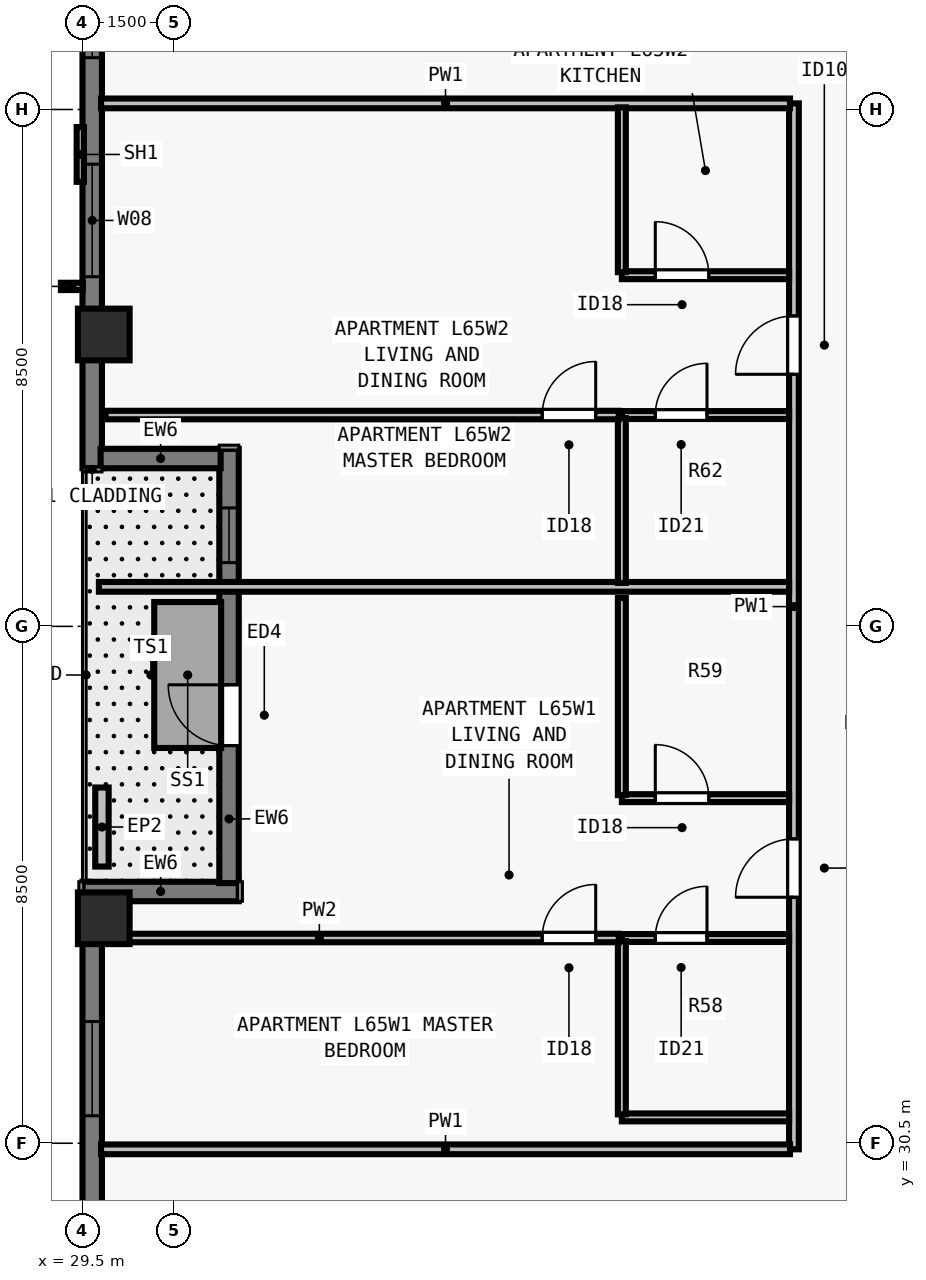
"""IFC4 building model, lengths in metres.
Left out: names, types, materials, properties, quantities, classifications, styles, units other than length and angle.
Written with IfcOpenShell. Run it as: python <this file> out.ifc"""

import sys

from ifc_helpers import new_model, si_unit, direction, frame, frame_2d, origin, origin_2d, place, context, subcontext, project, spatial, rectangle, extrude, element, fill, save


model = new_model("IFC4")
c1 = context("Model", 3, precision=1e-05, world=origin(), true_north=direction((0.0, 1.0)))
c2 = subcontext(c1, "Body", "Model", "MODEL_VIEW")
j1 = project(units=[si_unit("LENGTHUNIT", "METRE"), si_unit("PLANEANGLEUNIT", "RADIAN")], contexts=[c1])
p1 = place(None, origin())
s1 = spatial("IfcSite", under=j1, at=p1, CompositionType="ELEMENT")
p2 = place(p1, origin())
s2 = spatial("IfcBuilding", under=s1, at=p2, CompositionType="ELEMENT")
p3 = place(p2, frame((0.0, 0.0, 237.5)))
s3 = spatial("IfcBuildingStorey", under=s2, at=p3, CompositionType="ELEMENT", Elevation=237.5)
for number, where, z_axis, x_axis in (
    (1, (29.85, 43.8, 0.0), (0.0, 0.0, 1.0), (0.0, 1.0, 0.0)),
    (2, (29.85, 34.2, 0.0), (0.0, 0.0, 1.0), (0.0, 1.0, 0.0)),
):
    element("IfcColumn", number, at=place(p3, frame(where, z_axis=z_axis, x_axis=x_axis)), inside=s3, PredefinedType="COLUMN", context=c2, shape_type="SweptSolid", body=[
        extrude(rectangle(XDim=0.85, YDim=0.85, at=origin_2d()), origin(), (0.0, 0.0, 1.0), 3.5),
    ])
p4 = place(p3, frame((29.66, 41.6, 0.0), z_axis=(0.0, 0.0, 1.0), x_axis=(0.0, 1.0, 0.0)))
e3 = element("IfcWall", 3, at=p4, inside=s3, PredefinedType="SOLIDWALL", context=c2, shape_type="SweptSolid", body=[
    extrude(rectangle(XDim=14.602, YDim=0.32, at=frame_2d((7.301, 0.0))), origin(), (0.0, 0.0, 1.0), 3.29),
])
p5 = place(p4, frame((3.15, 0.0, 0.8)))
e4 = element("IfcOpeningElement", 4, at=p5, cuts=e3, PredefinedType="OPENING", context=c2, shape_type="SweptSolid", body=[
    extrude(rectangle(XDim=1.85, YDim=1.678, at=frame_2d((0.925, 0.839))), frame((0.0, 0.17, 0.0), z_axis=(0.0, -1.0, 0.0), x_axis=(1.0, 0.0, 0.0)), (0.0, 0.0, 1.0), 0.34),
])
p6 = place(p4, frame((6.751, 0.0, 0.8)))
e5 = element("IfcOpeningElement", 5, at=p6, cuts=e3, PredefinedType="OPENING", context=c2, shape_type="SweptSolid", body=[
    extrude(rectangle(XDim=1.55, YDim=1.678, at=frame_2d((0.775, 0.839))), frame((0.0, 0.17, 0.0), z_axis=(0.0, -1.0, 0.0), x_axis=(1.0, 0.0, 0.0)), (0.0, 0.0, 1.0), 0.34),
])
p7 = place(p3, frame((29.66, 21.5, 0.0), z_axis=(0.0, 0.0, 1.0), x_axis=(0.0, 1.0, 0.0)))
e6 = element("IfcWall", 6, at=p7, inside=s3, PredefinedType="SOLIDWALL", context=c2, shape_type="SweptSolid", body=[
    extrude(rectangle(XDim=13.002, YDim=0.32, at=frame_2d((6.501, 0.0))), origin(), (0.0, 0.0, 1.0), 3.29),
])
p8 = place(p7, frame((9.451, 0.0, 0.8)))
e7 = element("IfcOpeningElement", 7, at=p8, cuts=e6, PredefinedType="OPENING", context=c2, shape_type="SweptSolid", body=[
    extrude(rectangle(XDim=1.55, YDim=1.678, at=frame_2d((0.775, 0.839))), frame((0.0, 0.17, 0.0), z_axis=(0.0, -1.0, 0.0), x_axis=(1.0, 0.0, 0.0)), (0.0, 0.0, 1.0), 0.34),
])
p9 = place(p3, frame((29.5, 34.64, 0.0), z_axis=(0.0, 0.0, 1.0), x_axis=(1.0, 0.0, 0.0)))
e8 = element("IfcWall", 8, at=p9, inside=s3, PredefinedType="SOLIDWALL", context=c2, shape_type="SweptSolid", body=[
    extrude(rectangle(XDim=2.57, YDim=0.32, at=frame_2d((1.285, 0.0))), origin(), (0.0, 0.0, 1.0), 3.29),
])
p10 = place(p3, frame((31.91, 34.778, 0.0), z_axis=(0.0, 0.0, 1.0), x_axis=(0.0, 1.0, 0.0)))
e9 = element("IfcWall", 9, at=p10, inside=s3, PredefinedType="SOLIDWALL", context=c2, shape_type="SweptSolid", body=[
    extrude(rectangle(XDim=7.142, YDim=0.32, at=frame_2d((3.571, 0.0))), origin(), (0.0, 0.0, 1.0), 3.29),
])
p11 = place(p10, frame((2.261, 0.0, 0.0)))
e10 = element("IfcOpeningElement", 10, at=p11, cuts=e9, PredefinedType="OPENING", context=c2, shape_type="SweptSolid", body=[
    extrude(rectangle(XDim=1.0, YDim=2.15, at=frame_2d((0.5, 1.075))), frame((0.0, 0.17, 0.0), z_axis=(0.0, -1.0, 0.0), x_axis=(1.0, 0.0, 0.0)), (0.0, 0.0, 1.0), 0.34),
])
p12 = place(p10, frame((5.27, 0.0, 0.8)))
e11 = element("IfcOpeningElement", 11, at=p12, cuts=e9, PredefinedType="OPENING", context=c2, shape_type="SweptSolid", body=[
    extrude(rectangle(XDim=0.9, YDim=1.678, at=frame_2d((0.45, 0.839))), frame((0.0, 0.17, 0.0), z_axis=(0.0, -1.0, 0.0), x_axis=(1.0, 0.0, 0.0)), (0.0, 0.0, 1.0), 0.34),
])
p13 = place(p3, frame((31.772, 41.76, 0.0), z_axis=(0.0, 0.0, 1.0), x_axis=(-1.0, 0.0, 0.0)))
e12 = element("IfcWall", 12, at=p13, inside=s3, PredefinedType="SOLIDWALL", context=c2, shape_type="SweptSolid", body=[
    extrude(rectangle(XDim=1.974, YDim=0.32, at=frame_2d((0.987, 0.0))), origin(), (0.0, 0.0, 1.0), 3.29),
])
p14 = place(p3, frame((29.82, 35.05, 0.0), z_axis=(0.0, 0.0, 1.0), x_axis=(0.0, 1.0, 0.0)))
e13 = element("IfcWall", 13, at=p14, inside=s3, PredefinedType="PARAPET", context=c2, shape_type="SweptSolid", body=[
    extrude(rectangle(XDim=1.3, YDim=0.22, at=frame_2d((0.65, 0.0))), origin(), (0.0, 0.0, 1.0), 0.55),
])
p15 = place(p3, frame((41.2, 30.4, 0.0), z_axis=(0.0, 0.0, 1.0), x_axis=(0.0, 1.0, 0.0)))
e14 = element("IfcWall", 14, at=p15, inside=s3, PredefinedType="PARTITIONING", context=c2, shape_type="SweptSolid", body=[
    extrude(rectangle(XDim=17.2, YDim=0.16, at=frame_2d((8.6, 0.0))), origin(), (0.0, 0.0, 1.0), 3.29),
])
p16 = place(p15, frame((4.145, 0.0, 0.0)))
e15 = element("IfcOpeningElement", 15, at=p16, cuts=e14, PredefinedType="OPENING", context=c2, shape_type="SweptSolid", body=[
    extrude(rectangle(XDim=0.96, YDim=2.18, at=frame_2d((0.48, 1.09))), frame((0.0, 0.09, 0.0), z_axis=(0.0, -1.0, 0.0), x_axis=(1.0, 0.0, 0.0)), (0.0, 0.0, 1.0), 0.18),
])
p17 = place(p15, frame((12.745, 0.0, 0.0)))
e16 = element("IfcOpeningElement", 16, at=p17, cuts=e14, PredefinedType="OPENING", context=c2, shape_type="SweptSolid", body=[
    extrude(rectangle(XDim=0.96, YDim=2.18, at=frame_2d((0.48, 1.09))), frame((0.0, 0.09, 0.0), z_axis=(0.0, -1.0, 0.0), x_axis=(1.0, 0.0, 0.0)), (0.0, 0.0, 1.0), 0.18),
])
for number, where, z_axis, x_axis in (
    (17, (29.805, 30.4, 0.0), (0.0, 0.0, 1.0), (1.0, 0.0, 0.0)),
    (18, (29.805, 47.6, 0.0), (0.0, 0.0, 1.0), (1.0, 0.0, 0.0)),
):
    element("IfcWall", number, at=place(p3, frame(where, z_axis=z_axis, x_axis=x_axis)), inside=s3, PredefinedType="PARTITIONING", context=c2, shape_type="SweptSolid", body=[
        extrude(rectangle(XDim=11.33, YDim=0.16, at=frame_2d((5.665, 0.0))), origin(), (0.0, 0.0, 1.0), 3.29),
    ])
p18 = place(p3, frame((29.77, 39.65, 0.0), z_axis=(0.0, 0.0, 1.0), x_axis=(1.0, 0.0, 0.0)))
e19 = element("IfcWall", 19, at=p18, inside=s3, PredefinedType="PARTITIONING", context=c2, shape_type="SweptSolid", body=[
    extrude(rectangle(XDim=11.35, YDim=0.16, at=frame_2d((5.675, 0.0))), origin(), (0.0, 0.0, 1.0), 2.958),
])
p19 = place(p3, frame((38.37, 30.925, 0.0), z_axis=(0.0, 0.0, 1.0), x_axis=(1.0, 0.0, 0.0)))
e20 = element("IfcWall", 20, at=p19, inside=s3, PredefinedType="PLUMBINGWALL", context=c2, shape_type="SweptSolid", body=[
    extrude(rectangle(XDim=2.75, YDim=0.13, at=frame_2d((1.375, 0.0))), origin(), (0.0, 0.0, 1.0), 3.29),
])
p20 = place(p3, frame((38.37, 33.875, 0.0), z_axis=(0.0, 0.0, 1.0), x_axis=(1.0, 0.0, 0.0)))
e21 = element("IfcWall", 21, at=p20, inside=s3, PredefinedType="PLUMBINGWALL", context=c2, shape_type="SweptSolid", body=[
    extrude(rectangle(XDim=2.75, YDim=0.13, at=frame_2d((1.375, 0.0))), origin(), (0.0, 0.0, 1.0), 3.29),
])
p21 = place(p20, frame((0.55, 0.0, 0.0)))
e22 = element("IfcOpeningElement", 22, at=p21, cuts=e21, PredefinedType="OPENING", context=c2, shape_type="SweptSolid", body=[
    extrude(rectangle(XDim=0.85, YDim=2.08, at=frame_2d((0.425, 1.04))), frame((0.0, 0.075, 0.0), z_axis=(0.0, -1.0, 0.0), x_axis=(1.0, 0.0, 0.0)), (0.0, 0.0, 1.0), 0.15),
])
p22 = place(p3, frame((38.37, 30.975, 0.0), z_axis=(0.0, 0.0, 1.0), x_axis=(0.0, 1.0, 0.0)))
e23 = element("IfcWall", 23, at=p22, inside=s3, PredefinedType="PLUMBINGWALL", context=c2, shape_type="SweptSolid", body=[
    extrude(rectangle(XDim=2.85, YDim=0.13, at=frame_2d((1.425, 0.0))), origin(), (0.0, 0.0, 1.0), 3.29),
])
p23 = place(p3, frame((38.37, 36.175, 0.0), z_axis=(0.0, 0.0, 1.0), x_axis=(1.0, 0.0, 0.0)))
e24 = element("IfcWall", 24, at=p23, inside=s3, PredefinedType="PLUMBINGWALL", context=c2, shape_type="SweptSolid", body=[
    extrude(rectangle(XDim=2.75, YDim=0.13, at=frame_2d((1.375, 0.0))), origin(), (0.0, 0.0, 1.0), 3.29),
])
p24 = place(p23, frame((0.55, 0.0, 0.0)))
e25 = element("IfcOpeningElement", 25, at=p24, cuts=e24, PredefinedType="OPENING", context=c2, shape_type="SweptSolid", body=[
    extrude(rectangle(XDim=0.88, YDim=2.1, at=frame_2d((0.44, 1.05))), frame((0.0, 0.075, 0.0), z_axis=(0.0, -1.0, 0.0), x_axis=(1.0, 0.0, 0.0)), (0.0, 0.0, 1.0), 0.15),
])
p25 = place(p3, frame((38.37, 36.225, 0.0), z_axis=(0.0, 0.0, 1.0), x_axis=(0.0, 1.0, 0.0)))
e26 = element("IfcWall", 26, at=p25, inside=s3, PredefinedType="PLUMBINGWALL", context=c2, shape_type="SweptSolid", body=[
    extrude(rectangle(XDim=3.24, YDim=0.13, at=frame_2d((1.62, 0.0))), origin(), (0.0, 0.0, 1.0), 3.29),
])
p26 = place(p3, frame((29.88, 33.875, 0.0), z_axis=(0.0, 0.0, 1.0), x_axis=(1.0, 0.0, 0.0)))
e27 = element("IfcWall", 27, at=p26, inside=s3, PredefinedType="PARTITIONING", context=c2, shape_type="SweptSolid", body=[
    extrude(rectangle(XDim=8.44, YDim=0.14, at=frame_2d((4.22, 0.0))), origin(), (0.0, 0.0, 1.0), 2.573),
])
p27 = place(p26, frame((7.18, 0.0, 0.0)))
e28 = element("IfcOpeningElement", 28, at=p27, cuts=e27, PredefinedType="OPENING", context=c2, shape_type="SweptSolid", body=[
    extrude(rectangle(XDim=0.88, YDim=2.1, at=frame_2d((0.44, 1.05))), frame((0.0, 0.08, 0.0), z_axis=(0.0, -1.0, 0.0), x_axis=(1.0, 0.0, 0.0)), (0.0, 0.0, 1.0), 0.16),
])
p28 = place(p3, frame((38.37, 42.475, 0.0), z_axis=(0.0, 0.0, 1.0), x_axis=(1.0, 0.0, 0.0)))
e29 = element("IfcWall", 29, at=p28, inside=s3, PredefinedType="PLUMBINGWALL", context=c2, shape_type="SweptSolid", body=[
    extrude(rectangle(XDim=2.75, YDim=0.13, at=frame_2d((1.375, 0.0))), origin(), (0.0, 0.0, 1.0), 2.958),
])
p29 = place(p28, frame((0.55, 0.0, 0.0)))
e30 = element("IfcOpeningElement", 30, at=p29, cuts=e29, PredefinedType="OPENING", context=c2, shape_type="SweptSolid", body=[
    extrude(rectangle(XDim=0.85, YDim=2.08, at=frame_2d((0.425, 1.04))), frame((0.0, 0.075, 0.0), z_axis=(0.0, -1.0, 0.0), x_axis=(1.0, 0.0, 0.0)), (0.0, 0.0, 1.0), 0.15),
])
p30 = place(p3, frame((38.37, 39.715, 0.0), z_axis=(0.0, 0.0, 1.0), x_axis=(0.0, 1.0, 0.0)))
e31 = element("IfcWall", 31, at=p30, inside=s3, PredefinedType="PLUMBINGWALL", context=c2, shape_type="SweptSolid", body=[
    extrude(rectangle(XDim=2.71, YDim=0.13, at=frame_2d((1.355, 0.0))), origin(), (0.0, 0.0, 1.0), 3.29),
])
p31 = place(p3, frame((38.37, 44.775, 0.0), z_axis=(0.0, 0.0, 1.0), x_axis=(1.0, 0.0, 0.0)))
e32 = element("IfcWall", 32, at=p31, inside=s3, PredefinedType="PLUMBINGWALL", context=c2, shape_type="SweptSolid", body=[
    extrude(rectangle(XDim=2.75, YDim=0.13, at=frame_2d((1.375, 0.0))), origin(), (0.0, 0.0, 1.0), 2.958),
])
p32 = place(p31, frame((0.55, 0.0, 0.0)))
e33 = element("IfcOpeningElement", 33, at=p32, cuts=e32, PredefinedType="OPENING", context=c2, shape_type="SweptSolid", body=[
    extrude(rectangle(XDim=0.88, YDim=2.1, at=frame_2d((0.44, 1.05))), frame((0.0, 0.075, 0.0), z_axis=(0.0, -1.0, 0.0), x_axis=(1.0, 0.0, 0.0)), (0.0, 0.0, 1.0), 0.15),
])
p33 = place(p3, frame((38.37, 44.825, 0.0), z_axis=(0.0, 0.0, 1.0), x_axis=(0.0, 1.0, 0.0)))
e34 = element("IfcWall", 34, at=p33, inside=s3, PredefinedType="PLUMBINGWALL", context=c2, shape_type="SweptSolid", body=[
    extrude(rectangle(XDim=2.71, YDim=0.13, at=frame_2d((1.355, 0.0))), origin(), (0.0, 0.0, 1.0), 3.29),
])
p34 = place(p3, frame((29.88, 42.475, 0.0), z_axis=(0.0, 0.0, 1.0), x_axis=(1.0, 0.0, 0.0)))
e35 = element("IfcWall", 35, at=p34, inside=s3, PredefinedType="PARTITIONING", context=c2, shape_type="SweptSolid", body=[
    extrude(rectangle(XDim=8.44, YDim=0.14, at=frame_2d((4.22, 0.0))), origin(), (0.0, 0.0, 1.0), 3.29),
])
p35 = place(p34, frame((7.18, 0.0, 0.0)))
e36 = element("IfcOpeningElement", 36, at=p35, cuts=e35, PredefinedType="OPENING", context=c2, shape_type="SweptSolid", body=[
    extrude(rectangle(XDim=0.88, YDim=2.1, at=frame_2d((0.44, 1.05))), frame((0.0, 0.08, 0.0), z_axis=(0.0, -1.0, 0.0), x_axis=(1.0, 0.0, 0.0)), (0.0, 0.0, 1.0), 0.16),
])
p36 = place(p5, origin())
e37 = element("IfcWindow", 37, at=p36, inside=s3, PartitioningType="SINGLE_PANEL", PredefinedType="WINDOW", context=c2, shape_type="SweptSolid", body=[
    extrude(rectangle(XDim=1.85, YDim=1.678, at=frame_2d((0.925, 0.839))), frame((0.0, -0.05, 0.0), z_axis=(0.0, -1.0, 0.0), x_axis=(1.0, 0.0, 0.0)), (0.0, 0.0, 1.0), 0.06),
])
fill(e4, e37)
p37 = place(p6, origin())
e38 = element("IfcWindow", 38, at=p37, inside=s3, PartitioningType="SINGLE_PANEL", PredefinedType="WINDOW", context=c2, shape_type="SweptSolid", body=[
    extrude(rectangle(XDim=1.55, YDim=1.678, at=frame_2d((0.775, 0.839))), frame((0.0, -0.05, 0.0), z_axis=(0.0, -1.0, 0.0), x_axis=(1.0, 0.0, 0.0)), (0.0, 0.0, 1.0), 0.06),
])
fill(e5, e38)
p38 = place(p8, origin())
e39 = element("IfcWindow", 39, at=p38, inside=s3, PartitioningType="SINGLE_PANEL", PredefinedType="WINDOW", context=c2, shape_type="SweptSolid", body=[
    extrude(rectangle(XDim=1.55, YDim=1.678, at=frame_2d((0.775, 0.839))), frame((0.0, -0.05, 0.0), z_axis=(0.0, -1.0, 0.0), x_axis=(1.0, 0.0, 0.0)), (0.0, 0.0, 1.0), 0.06),
])
fill(e7, e39)
p39 = place(p11, origin())
e40 = element("IfcDoor", 40, at=p39, inside=s3, OperationType="SINGLE_SWING_RIGHT", PredefinedType="DOOR", context=c2, shape_type="SweptSolid", body=[
    extrude(rectangle(XDim=1.0, YDim=2.15, at=frame_2d((0.5, 1.075))), frame((0.0, 0.025, 0.0), z_axis=(0.0, -1.0, 0.0), x_axis=(1.0, 0.0, 0.0)), (0.0, 0.0, 1.0), 0.05),
])
fill(e10, e40)
p40 = place(p12, origin())
e41 = element("IfcWindow", 41, at=p40, inside=s3, PartitioningType="SINGLE_PANEL", PredefinedType="WINDOW", context=c2, shape_type="SweptSolid", body=[
    extrude(rectangle(XDim=0.9, YDim=1.678, at=frame_2d((0.45, 0.839))), frame((0.0, -0.04, 0.0), z_axis=(0.0, -1.0, 0.0), x_axis=(1.0, 0.0, 0.0)), (0.0, 0.0, 1.0), 0.06),
])
fill(e11, e41)
p41 = place(p21, origin())
e42 = element("IfcDoor", 42, at=p41, inside=s3, OperationType="SINGLE_SWING_RIGHT", PredefinedType="DOOR", context=c2, shape_type="SweptSolid", body=[
    extrude(rectangle(XDim=0.85, YDim=2.08, at=frame_2d((0.425, 1.04))), frame((0.0, 0.025, 0.0), z_axis=(0.0, -1.0, 0.0), x_axis=(1.0, 0.0, 0.0)), (0.0, 0.0, 1.0), 0.05),
])
fill(e22, e42)
p42 = place(p24, origin())
e43 = element("IfcDoor", 43, at=p42, inside=s3, OperationType="SINGLE_SWING_LEFT", PredefinedType="DOOR", context=c2, shape_type="SweptSolid", body=[
    extrude(rectangle(XDim=0.88, YDim=2.1, at=frame_2d((0.44, 1.05))), frame((0.0, 0.025, 0.0), z_axis=(0.0, -1.0, 0.0), x_axis=(1.0, 0.0, 0.0)), (0.0, 0.0, 1.0), 0.05),
])
fill(e25, e43)
p43 = place(p27, origin())
e44 = element("IfcDoor", 44, at=p43, inside=s3, OperationType="SINGLE_SWING_RIGHT", PredefinedType="DOOR", context=c2, shape_type="SweptSolid", body=[
    extrude(rectangle(XDim=0.88, YDim=2.1, at=frame_2d((0.44, 1.05))), frame((0.0, 0.025, 0.0), z_axis=(0.0, -1.0, 0.0), x_axis=(1.0, 0.0, 0.0)), (0.0, 0.0, 1.0), 0.05),
])
fill(e28, e44)
p44 = place(p16, origin())
e45 = element("IfcDoor", 45, at=p44, inside=s3, OperationType="SINGLE_SWING_LEFT", PredefinedType="DOOR", context=c2, shape_type="SweptSolid", body=[
    extrude(rectangle(XDim=0.96, YDim=2.18, at=frame_2d((0.48, 1.09))), frame((0.0, 0.025, 0.0), z_axis=(0.0, -1.0, 0.0), x_axis=(1.0, 0.0, 0.0)), (0.0, 0.0, 1.0), 0.05),
])
fill(e15, e45)
p45 = place(p29, origin())
e46 = element("IfcDoor", 46, at=p45, inside=s3, OperationType="SINGLE_SWING_RIGHT", PredefinedType="DOOR", context=c2, shape_type="SweptSolid", body=[
    extrude(rectangle(XDim=0.85, YDim=2.08, at=frame_2d((0.425, 1.04))), frame((0.0, 0.025, 0.0), z_axis=(0.0, -1.0, 0.0), x_axis=(1.0, 0.0, 0.0)), (0.0, 0.0, 1.0), 0.05),
])
fill(e30, e46)
p46 = place(p32, origin())
e47 = element("IfcDoor", 47, at=p46, inside=s3, OperationType="SINGLE_SWING_LEFT", PredefinedType="DOOR", context=c2, shape_type="SweptSolid", body=[
    extrude(rectangle(XDim=0.88, YDim=2.1, at=frame_2d((0.44, 1.05))), frame((0.0, 0.025, 0.0), z_axis=(0.0, -1.0, 0.0), x_axis=(1.0, 0.0, 0.0)), (0.0, 0.0, 1.0), 0.05),
])
fill(e33, e47)
p47 = place(p35, origin())
e48 = element("IfcDoor", 48, at=p47, inside=s3, OperationType="SINGLE_SWING_RIGHT", PredefinedType="DOOR", context=c2, shape_type="SweptSolid", body=[
    extrude(rectangle(XDim=0.88, YDim=2.1, at=frame_2d((0.44, 1.05))), frame((0.0, 0.025, 0.0), z_axis=(0.0, -1.0, 0.0), x_axis=(1.0, 0.0, 0.0)), (0.0, 0.0, 1.0), 0.05),
])
fill(e36, e48)
p48 = place(p17, origin())
e49 = element("IfcDoor", 49, at=p48, inside=s3, OperationType="SINGLE_SWING_LEFT", PredefinedType="DOOR", context=c2, shape_type="SweptSolid", body=[
    extrude(rectangle(XDim=0.96, YDim=2.18, at=frame_2d((0.48, 1.09))), frame((0.0, 0.025, 0.0), z_axis=(0.0, -1.0, 0.0), x_axis=(1.0, 0.0, 0.0)), (0.0, 0.0, 1.0), 0.05),
])
fill(e16, e49)
save(model, sys.argv[1])
